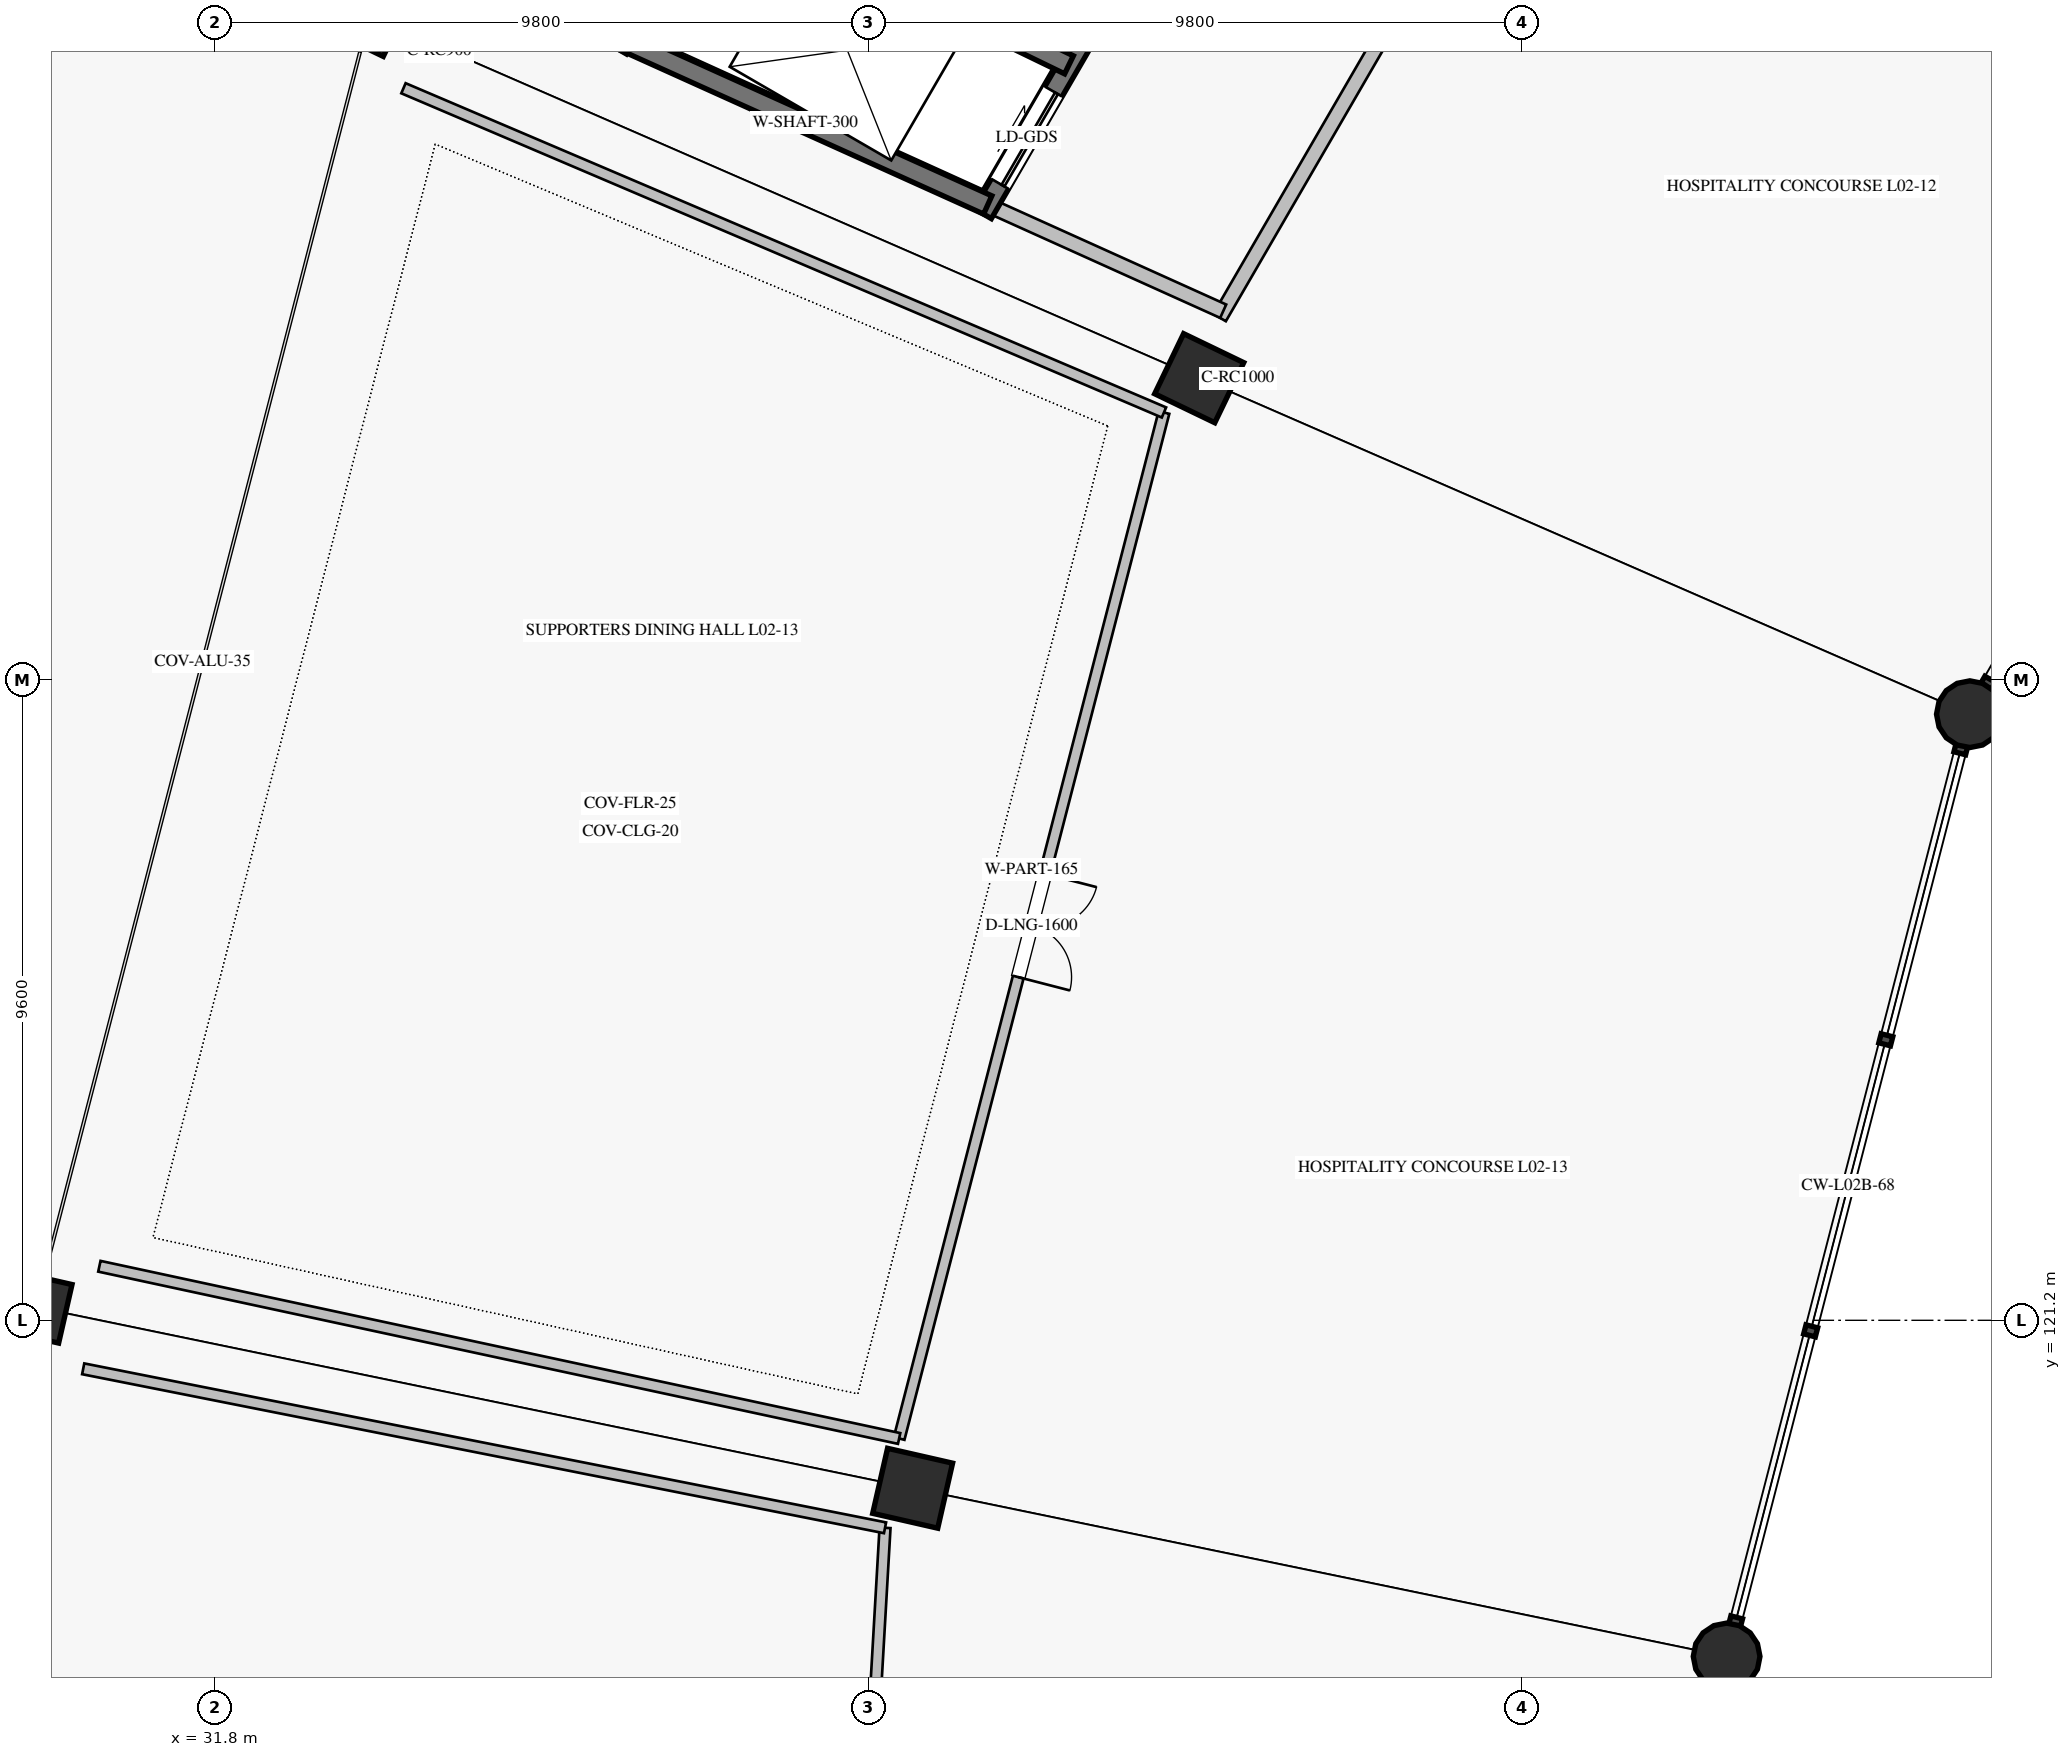
"""IFC4 building model, lengths in metres.
Left out: names, types, materials, properties, quantities, classifications, styles, units other than length and angle.
Written with IfcOpenShell. Run it as: python <this file> out.ifc"""

import sys

from ifc_helpers import new_model, si_unit, direction, frame, frame_2d, origin, origin_2d, place, context, subcontext, project, spatial, rectangle, circle, extrude, element, fill, save


model = new_model("IFC4")
c1 = context("Model", 3, precision=1e-05, world=origin(), true_north=direction((0.0, 1.0)))
c2 = subcontext(c1, "Body", "Model", "MODEL_VIEW")
j1 = project(units=[si_unit("LENGTHUNIT", "METRE"), si_unit("PLANEANGLEUNIT", "RADIAN")], contexts=[c1])
p1 = place(None, origin())
s1 = spatial("IfcSite", under=j1, at=p1, CompositionType="ELEMENT")
p2 = place(p1, origin())
s2 = spatial("IfcBuilding", under=s1, at=p2, CompositionType="ELEMENT")
p3 = place(p2, frame((0.0, 0.0, 10.54)))
s3 = spatial("IfcBuildingStorey", under=s2, at=p3, CompositionType="ELEMENT", Elevation=10.54)
for number, where, z_axis, x_axis in (
    (1, (58.114, 130.287, 0.0), (0.0, 0.0, 1.0), (-0.901, 0.434, 0.0)),
    (2, (54.467, 116.16, 0.0), (0.0, 0.0, 1.0), (-0.975, 0.223, 0.0)),
):
    element("IfcColumn", number, at=place(p3, frame(where, z_axis=z_axis, x_axis=x_axis)), inside=s3, PredefinedType="COLUMN", context=c2, shape_type="SweptSolid", body=[
        extrude(circle(Radius=0.5, at=origin_2d()), origin(), (0.0, 0.0, 1.0), 5.1),
    ])
for number, where, z_axis, x_axis in (
    (3, (46.559, 135.325, 0.0), (0.0, 0.0, 1.0), (-0.901, 0.434, 0.0)),
    (4, (42.262, 118.682, 0.0), (0.0, 0.0, 1.0), (-0.975, 0.223, 0.0)),
):
    element("IfcColumn", number, at=place(p3, frame(where, z_axis=z_axis, x_axis=x_axis)), inside=s3, PredefinedType="COLUMN", context=c2, shape_type="SweptSolid", body=[
        extrude(rectangle(XDim=1.0, YDim=1.0, at=origin_2d()), origin(), (0.0, 0.0, 1.0), 5.1),
    ])
for number, where, z_axis, x_axis in (
    (5, (34.115, 140.75, 0.0), (0.0, 0.0, 1.0), (-0.901, 0.434, 0.0)),
    (6, (29.119, 121.398, 0.0), (0.0, 0.0, 1.0), (-0.975, 0.223, 0.0)),
):
    element("IfcColumn", number, at=place(p3, frame(where, z_axis=z_axis, x_axis=x_axis)), inside=s3, PredefinedType="COLUMN", context=c2, shape_type="SweptSolid", body=[
        extrude(rectangle(XDim=0.9, YDim=0.9, at=origin_2d()), origin(), (0.0, 0.0, 1.0), 5.1),
    ])
p4 = place(p3, frame((45.9, 142.254, 0.0), z_axis=(0.0, 0.0, 1.0), x_axis=(-0.501629534056, -0.86508254552, 0.0)))
e7 = element("IfcWall", 7, at=p4, inside=s3, PredefinedType="SHEAR", context=c2, shape_type="SweptSolid", body=[
    extrude(rectangle(XDim=5.157, YDim=0.3, at=frame_2d((2.579, 0.0))), origin(), (0.0, 0.0, 1.0), 4.84),
])
p5 = place(p4, frame((0.766, 0.0, 0.0)))
e8 = element("IfcOpeningElement", 8, at=p5, cuts=e7, PredefinedType="OPENING", context=c2, shape_type="SweptSolid", body=[
    extrude(rectangle(XDim=1.1, YDim=2.2, at=frame_2d((0.55, 1.1))), frame((0.0, 0.16, 0.0), z_axis=(0.0, -1.0, 0.0), x_axis=(1.0, 0.0, 0.0)), (0.0, 0.0, 1.0), 0.32),
])
p6 = place(p4, frame((3.042, 0.0, 0.0)))
e9 = element("IfcOpeningElement", 9, at=p6, cuts=e7, PredefinedType="OPENING", context=c2, shape_type="SweptSolid", body=[
    extrude(rectangle(XDim=1.6, YDim=2.3, at=frame_2d((0.8, 1.15))), frame((0.0, 0.16, 0.0), z_axis=(0.0, -1.0, 0.0), x_axis=(1.0, 0.0, 0.0)), (0.0, 0.0, 1.0), 0.32),
])
p7 = place(p3, frame((40.595, 145.012, 0.0), z_axis=(0.0, 0.0, 1.0), x_axis=(-0.501630260479, -0.865082124293, 0.0)))
e10 = element("IfcWall", 10, at=p7, inside=s3, PredefinedType="SHEAR", context=c2, shape_type="SweptSolid", body=[
    extrude(rectangle(XDim=5.491, YDim=0.3, at=frame_2d((2.746, 0.0))), origin(), (0.0, 0.0, 1.0), 4.84),
])
p8 = place(p3, frame((43.388, 137.922, 0.0), z_axis=(0.0, 0.0, 1.0), x_axis=(-0.911521602376, 0.41125219562, 0.0)))
e11 = element("IfcWall", 11, at=p8, inside=s3, PredefinedType="SHEAR", context=c2, shape_type="SweptSolid", body=[
    extrude(rectangle(XDim=6.004, YDim=0.3, at=frame_2d((3.002, 0.0))), origin(), (0.0, 0.0, 1.0), 4.84),
])
p9 = place(p3, frame((44.606, 140.023, 0.0), z_axis=(0.0, 0.0, 1.0), x_axis=(-0.899759302591, 0.436386522936, 0.0)))
e12 = element("IfcWall", 12, at=p9, inside=s3, PredefinedType="SHEAR", context=c2, shape_type="SweptSolid", body=[
    extrude(rectangle(XDim=5.989, YDim=0.3, at=frame_2d((2.995, 0.0))), origin(), (0.0, 0.0, 1.0), 4.84),
])
p10 = place(p3, frame((54.944, 150.17, 0.0), z_axis=(0.0, 0.0, 1.0), x_axis=(-0.501612626242, -0.865092349518, 0.0)))
e13 = element("IfcWall", 13, at=p10, inside=s3, PredefinedType="SOLIDWALL", context=c2, shape_type="SweptSolid", body=[
    extrude(rectangle(XDim=16.11, YDim=0.22, at=frame_2d((8.055, 0.0))), origin(), (0.0, 0.0, 1.0), 3.788),
])
p11 = place(p10, frame((6.511, 0.0, 0.0)))
e14 = element("IfcOpeningElement", 14, at=p11, cuts=e13, PredefinedType="OPENING", context=c2, shape_type="SweptSolid", body=[
    extrude(rectangle(XDim=1.5, YDim=2.2, at=frame_2d((0.75, 1.1))), frame((0.0, 0.12, 0.0), z_axis=(0.0, -1.0, 0.0), x_axis=(1.0, 0.0, 0.0)), (0.0, 0.0, 1.0), 0.24),
])
p12 = place(p3, frame((46.918, 136.329, 0.0), z_axis=(0.0, 0.0, 1.0), x_axis=(-0.91149641055, 0.411308027582, 0.0)))
e15 = element("IfcWall", 15, at=p12, inside=s3, PredefinedType="SOLIDWALL", context=c2, shape_type="SweptSolid", body=[
    extrude(rectangle(XDim=3.873, YDim=0.22, at=frame_2d((1.937, 0.0))), origin(), (0.0, 0.0, 1.0), 4.84),
])
p13 = place(p3, frame((46.031, 134.811, 0.0), z_axis=(0.0, 0.0, 1.0), x_axis=(-0.249970043824, -0.968253570709, 0.0)))
e16 = element("IfcWall", 16, at=p13, inside=s3, PredefinedType="PARTITIONING", context=c2, shape_type="SweptSolid", body=[
    extrude(rectangle(XDim=15.887, YDim=0.165, at=frame_2d((7.943, 0.0))), origin(), (0.0, 0.0, 1.0), 4.16),
])
p14 = place(p13, frame((7.143, 0.0, 0.0)))
e17 = element("IfcOpeningElement", 17, at=p14, cuts=e16, PredefinedType="OPENING", context=c2, shape_type="SweptSolid", body=[
    extrude(rectangle(XDim=1.6, YDim=2.3, at=frame_2d((0.8, 1.15))), frame((0.0, 0.093, 0.0), z_axis=(0.0, -1.0, 0.0), x_axis=(1.0, 0.0, 0.0)), (0.0, 0.0, 1.0), 0.185),
])
p15 = place(p3, frame((46.031, 134.811, 0.0), z_axis=(0.0, 0.0, 1.0), x_axis=(-0.919905328402, 0.392140519173, 0.0)))
e18 = element("IfcWall", 18, at=p15, inside=s3, PredefinedType="PARTITIONING", context=c2, shape_type="SweptSolid", body=[
    extrude(rectangle(XDim=12.396, YDim=0.165, at=frame_2d((6.198, 0.0))), origin(), (0.0, 0.0, 1.0), 4.16),
])
p16 = place(p3, frame((42.06, 119.428, 0.0), z_axis=(0.0, 0.0, 1.0), x_axis=(-0.97759337709, 0.210502230558, 0.0)))
e19 = element("IfcWall", 19, at=p16, inside=s3, PredefinedType="PARTITIONING", context=c2, shape_type="SweptSolid", body=[
    extrude(rectangle(XDim=12.266, YDim=0.165, at=frame_2d((6.133, 0.0))), origin(), (0.0, 0.0, 1.0), 4.16),
])
p17 = place(p3, frame((41.848, 118.089, 0.0), z_axis=(0.0, 0.0, 1.0), x_axis=(-0.057603503798, -0.998339539611, 0.0)))
e20 = element("IfcWall", 20, at=p17, inside=s3, PredefinedType="PARTITIONING", context=c2, shape_type="SweptSolid", body=[
    extrude(rectangle(XDim=15.444, YDim=0.165, at=frame_2d((7.722, 0.0))), origin(), (0.0, 0.0, 1.0), 4.16),
])
p18 = place(p17, frame((6.847, 0.0, 0.0)))
e21 = element("IfcOpeningElement", 21, at=p18, cuts=e20, PredefinedType="OPENING", context=c2, shape_type="SweptSolid", body=[
    extrude(rectangle(XDim=1.75, YDim=2.3, at=frame_2d((0.875, 1.15))), frame((0.0, 0.093, 0.0), z_axis=(0.0, -1.0, 0.0), x_axis=(1.0, 0.0, 0.0)), (0.0, 0.0, 1.0), 0.185),
])
p19 = place(p3, frame((41.848, 118.089, 0.0), z_axis=(0.0, 0.0, 1.0), x_axis=(-0.980904167784, 0.194491680088, 0.0)))
e22 = element("IfcWall", 22, at=p19, inside=s3, PredefinedType="PARTITIONING", context=c2, shape_type="SweptSolid", body=[
    extrude(rectangle(XDim=12.257, YDim=0.165, at=frame_2d((6.128, 0.0))), origin(), (0.0, 0.0, 1.0), 4.16),
])
p20 = place(p6, origin())
e23 = element("IfcDoor", 23, at=p20, inside=s3, OperationType="SLIDING_TO_LEFT", PredefinedType="DOOR", context=c2, shape_type="SweptSolid", body=[
    extrude(rectangle(XDim=1.6, YDim=2.3, at=frame_2d((0.8, 1.15))), frame((0.0, 0.025, 0.0), z_axis=(0.0, -1.0, 0.0), x_axis=(1.0, 0.0, 0.0)), (0.0, 0.0, 1.0), 0.05),
])
fill(e9, e23)
p21 = place(p14, origin())
e24 = element("IfcDoor", 24, at=p21, inside=s3, OperationType="DOUBLE_DOOR_SINGLE_SWING", PredefinedType="DOOR", context=c2, shape_type="SweptSolid", body=[
    extrude(rectangle(XDim=1.6, YDim=2.3, at=frame_2d((0.8, 1.15))), frame((0.0, 0.025, 0.0), z_axis=(0.0, -1.0, 0.0), x_axis=(1.0, 0.0, 0.0)), (0.0, 0.0, 1.0), 0.05),
])
fill(e17, e24)
save(model, sys.argv[1])
